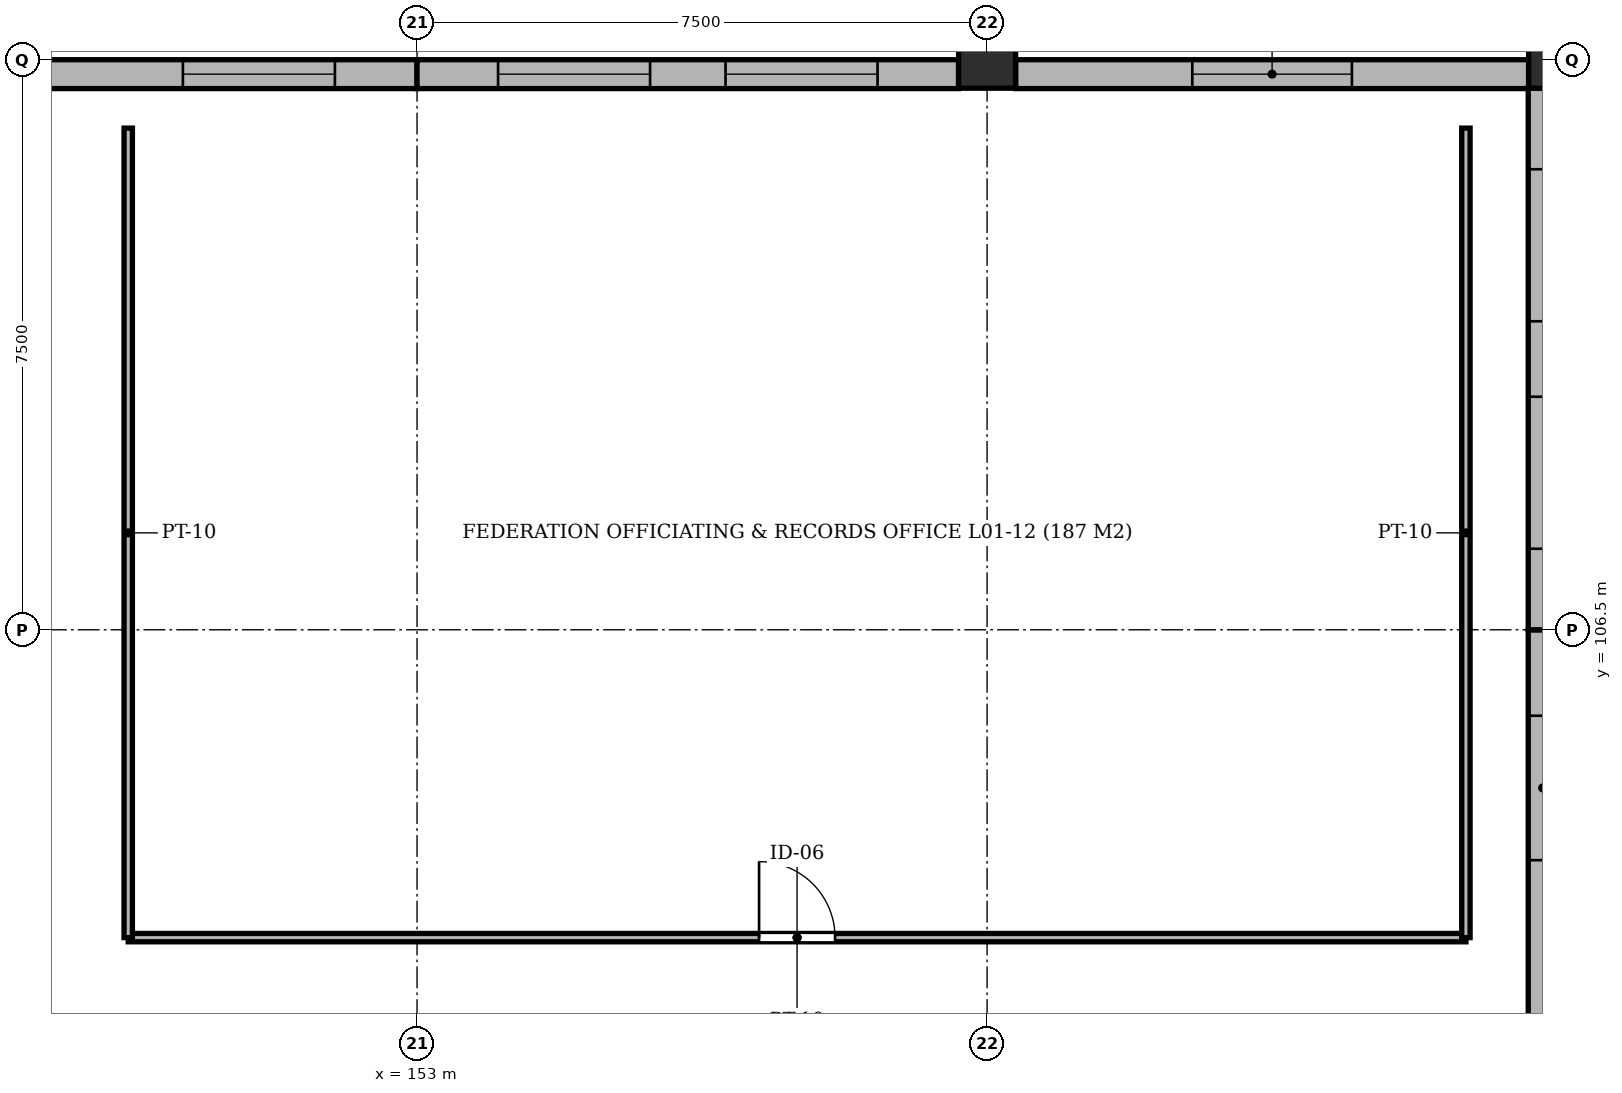
"""IFC4 building model, lengths in metres.
Left out: names, types, materials, properties, quantities, classifications, styles, units other than length and angle.
Written with IfcOpenShell. Run it as: python <this file> out.ifc"""

import sys

from ifc_helpers import new_model, si_unit, direction, frame, frame_2d, origin, origin_2d, place, context, subcontext, project, spatial, rectangle, extrude, element, fill, save


model = new_model("IFC4")
c1 = context("Model", 3, precision=1e-05, world=origin(), true_north=direction((0.0, 1.0)))
c2 = subcontext(c1, "Body", "Model", "MODEL_VIEW")
j1 = project(units=[si_unit("LENGTHUNIT", "METRE"), si_unit("PLANEANGLEUNIT", "RADIAN")], contexts=[c1])
p1 = place(None, origin())
s1 = spatial("IfcSite", under=j1, at=p1, CompositionType="ELEMENT")
p2 = place(p1, origin())
s2 = spatial("IfcBuilding", under=s1, at=p2, CompositionType="ELEMENT")
p3 = place(p2, frame((0.0, 0.0, 4.6)))
s3 = spatial("IfcBuildingStorey", under=s2, at=p3, CompositionType="ELEMENT", Elevation=4.6)
for number, where, z_axis, x_axis in (
    (1, (160.5, 114.0, -0.3), (0.0, 0.0, 1.0), (1.0, 0.0, 0.0)),
    (2, (168.0, 114.0, -0.3), (0.0, 0.0, 1.0), (1.0, 0.0, 0.0)),
):
    element("IfcColumn", number, at=place(p3, frame(where, z_axis=z_axis, x_axis=x_axis)), inside=s3, PredefinedType="COLUMN", context=c2, shape_type="SweptSolid", body=[
        extrude(rectangle(XDim=0.75, YDim=0.75, at=origin_2d()), origin(), (0.0, 0.0, 1.0), 4.65),
    ])
p4 = place(p3, frame((153.0, 113.81, 0.0), z_axis=(0.0, 0.0, 1.0), x_axis=(-1.0, 0.0, 0.0)))
e3 = element("IfcWall", 3, at=p4, inside=s3, PredefinedType="SOLIDWALL", context=c2, shape_type="SweptSolid", body=[
    extrude(rectangle(XDim=7.175, YDim=0.38, at=frame_2d((3.587, 0.0))), origin(), (0.0, 0.0, 1.0), 3.65),
])
p5 = place(p4, frame((1.081, 0.0, 0.92)))
e4 = element("IfcOpeningElement", 4, at=p5, cuts=e3, PredefinedType="OPENING", context=c2, shape_type="SweptSolid", body=[
    extrude(rectangle(XDim=2.0, YDim=2.3, at=frame_2d((1.0, 1.15))), frame((0.0, 0.202, 0.0), z_axis=(0.0, -1.0, 0.0), x_axis=(1.0, 0.0, 0.0)), (0.0, 0.0, 1.0), 0.404),
])
p6 = place(p3, frame((160.125, 113.81, 0.0), z_axis=(0.0, 0.0, 1.0), x_axis=(-1.0, 0.0, 0.0)))
e5 = element("IfcWall", 5, at=p6, inside=s3, PredefinedType="SOLIDWALL", context=c2, shape_type="SweptSolid", body=[
    extrude(rectangle(XDim=7.125, YDim=0.38, at=frame_2d((3.562, 0.0))), origin(), (0.0, 0.0, 1.0), 3.65),
])
p7 = place(p6, frame((4.059, 0.0, 0.92)))
e6 = element("IfcOpeningElement", 6, at=p7, cuts=e5, PredefinedType="OPENING", context=c2, shape_type="SweptSolid", body=[
    extrude(rectangle(XDim=2.0, YDim=2.3, at=frame_2d((1.0, 1.15))), frame((0.0, 0.202, 0.0), z_axis=(0.0, -1.0, 0.0), x_axis=(1.0, 0.0, 0.0)), (0.0, 0.0, 1.0), 0.404),
])
p8 = place(p6, frame((1.066, 0.0, 0.92)))
e7 = element("IfcOpeningElement", 7, at=p8, cuts=e5, PredefinedType="OPENING", context=c2, shape_type="SweptSolid", body=[
    extrude(rectangle(XDim=2.0, YDim=2.3, at=frame_2d((1.0, 1.15))), frame((0.0, 0.202, 0.0), z_axis=(0.0, -1.0, 0.0), x_axis=(1.0, 0.0, 0.0)), (0.0, 0.0, 1.0), 0.404),
])
p9 = place(p3, frame((167.625, 113.81, 0.0), z_axis=(0.0, 0.0, 1.0), x_axis=(-1.0, 0.0, 0.0)))
e8 = element("IfcWall", 8, at=p9, inside=s3, PredefinedType="SOLIDWALL", context=c2, shape_type="SweptSolid", body=[
    extrude(rectangle(XDim=6.75, YDim=0.38, at=frame_2d((3.375, 0.0))), origin(), (0.0, 0.0, 1.0), 4.02),
])
p10 = place(p9, frame((2.325, 0.0, 0.92)))
e9 = element("IfcOpeningElement", 9, at=p10, cuts=e8, PredefinedType="OPENING", context=c2, shape_type="SweptSolid", body=[
    extrude(rectangle(XDim=2.1, YDim=2.3, at=frame_2d((1.05, 1.15))), frame((0.0, 0.202, 0.0), z_axis=(0.0, -1.0, 0.0), x_axis=(1.0, 0.0, 0.0)), (0.0, 0.0, 1.0), 0.404),
])
p11 = place(p3, frame((167.81, 99.325, 0.0), z_axis=(0.0, 0.0, 1.0), x_axis=(0.0, 1.0, 0.0)))
e10 = element("IfcWall", 10, at=p11, inside=s3, PredefinedType="SOLIDWALL", context=c2, shape_type="SweptSolid", body=[
    extrude(rectangle(XDim=7.175, YDim=0.38, at=frame_2d((3.587, 0.0))), origin(), (0.0, 0.0, 1.0), 3.65),
])
p12 = place(p11, frame((4.144, 0.0, 0.92)))
e11 = element("IfcOpeningElement", 11, at=p12, cuts=e10, PredefinedType="OPENING", context=c2, shape_type="SweptSolid", body=[
    extrude(rectangle(XDim=1.9, YDim=2.3, at=frame_2d((0.95, 1.15))), frame((0.0, 0.202, 0.0), z_axis=(0.0, -1.0, 0.0), x_axis=(1.0, 0.0, 0.0)), (0.0, 0.0, 1.0), 0.404),
])
p13 = place(p3, frame((167.81, 106.5, 0.0), z_axis=(0.0, 0.0, 1.0), x_axis=(0.0, 1.0, 0.0)))
e12 = element("IfcWall", 12, at=p13, inside=s3, PredefinedType="SOLIDWALL", context=c2, shape_type="SweptSolid", body=[
    extrude(rectangle(XDim=7.125, YDim=0.38, at=frame_2d((3.562, 0.0))), origin(), (0.0, 0.0, 1.0), 3.65),
])
p14 = place(p13, frame((1.066, 0.0, 0.92)))
e13 = element("IfcOpeningElement", 13, at=p14, cuts=e12, PredefinedType="OPENING", context=c2, shape_type="SweptSolid", body=[
    extrude(rectangle(XDim=2.0, YDim=2.3, at=frame_2d((1.0, 1.15))), frame((0.0, 0.202, 0.0), z_axis=(0.0, -1.0, 0.0), x_axis=(1.0, 0.0, 0.0)), (0.0, 0.0, 1.0), 0.404),
])
p15 = place(p13, frame((4.059, 0.0, 0.92)))
e14 = element("IfcOpeningElement", 14, at=p15, cuts=e12, PredefinedType="OPENING", context=c2, shape_type="SweptSolid", body=[
    extrude(rectangle(XDim=2.0, YDim=2.3, at=frame_2d((1.0, 1.15))), frame((0.0, 0.202, 0.0), z_axis=(0.0, -1.0, 0.0), x_axis=(1.0, 0.0, 0.0)), (0.0, 0.0, 1.0), 0.404),
])
p16 = place(p3, frame((149.2, 102.45, 0.0), z_axis=(0.0, 0.0, 1.0), x_axis=(1.0, 0.0, 0.0)))
e15 = element("IfcWall", 15, at=p16, inside=s3, PredefinedType="PARTITIONING", context=c2, shape_type="SweptSolid", body=[
    extrude(rectangle(XDim=17.6, YDim=0.11, at=frame_2d((8.8, 0.0))), origin(), (0.0, 0.0, 1.0), 4.08),
])
p17 = place(p16, frame((8.3, 0.0, 0.0)))
e16 = element("IfcOpeningElement", 16, at=p17, cuts=e15, PredefinedType="OPENING", context=c2, shape_type="SweptSolid", body=[
    extrude(rectangle(XDim=1.0, YDim=2.15, at=frame_2d((0.5, 1.075))), frame((0.0, 0.067, 0.0), z_axis=(0.0, -1.0, 0.0), x_axis=(1.0, 0.0, 0.0)), (0.0, 0.0, 1.0), 0.134),
])
for number, where, z_axis, x_axis in (
    (17, (149.2, 102.45, 0.0), (0.0, 0.0, 1.0), (0.0, 1.0, 0.0)),
    (18, (166.8, 102.45, 0.0), (0.0, 0.0, 1.0), (0.0, 1.0, 0.0)),
):
    element("IfcWall", number, at=place(p3, frame(where, z_axis=z_axis, x_axis=x_axis)), inside=s3, PredefinedType="PARTITIONING", context=c2, shape_type="SweptSolid", body=[
        extrude(rectangle(XDim=10.65, YDim=0.11, at=frame_2d((5.325, 0.0))), origin(), (0.0, 0.0, 1.0), 4.08),
    ])
p18 = place(p5, origin())
e19 = element("IfcWindow", 19, at=p18, inside=s3, PartitioningType="SINGLE_PANEL", PredefinedType="WINDOW", context=c2, shape_type="SweptSolid", body=[
    extrude(rectangle(XDim=2.0, YDim=2.3, at=frame_2d((1.0, 1.15))), frame((0.0, 0.03, 0.0), z_axis=(0.0, -1.0, 0.0), x_axis=(1.0, 0.0, 0.0)), (0.0, 0.0, 1.0), 0.06),
])
fill(e4, e19)
p19 = place(p7, origin())
e20 = element("IfcWindow", 20, at=p19, inside=s3, PartitioningType="SINGLE_PANEL", PredefinedType="WINDOW", context=c2, shape_type="SweptSolid", body=[
    extrude(rectangle(XDim=2.0, YDim=2.3, at=frame_2d((1.0, 1.15))), frame((0.0, 0.03, 0.0), z_axis=(0.0, -1.0, 0.0), x_axis=(1.0, 0.0, 0.0)), (0.0, 0.0, 1.0), 0.06),
])
fill(e6, e20)
p20 = place(p8, origin())
e21 = element("IfcWindow", 21, at=p20, inside=s3, PartitioningType="SINGLE_PANEL", PredefinedType="WINDOW", context=c2, shape_type="SweptSolid", body=[
    extrude(rectangle(XDim=2.0, YDim=2.3, at=frame_2d((1.0, 1.15))), frame((0.0, 0.03, 0.0), z_axis=(0.0, -1.0, 0.0), x_axis=(1.0, 0.0, 0.0)), (0.0, 0.0, 1.0), 0.06),
])
fill(e7, e21)
p21 = place(p10, origin())
e22 = element("IfcWindow", 22, at=p21, inside=s3, PartitioningType="SINGLE_PANEL", PredefinedType="WINDOW", context=c2, shape_type="SweptSolid", body=[
    extrude(rectangle(XDim=2.1, YDim=2.3, at=frame_2d((1.05, 1.15))), frame((0.0, 0.03, 0.0), z_axis=(0.0, -1.0, 0.0), x_axis=(1.0, 0.0, 0.0)), (0.0, 0.0, 1.0), 0.06),
])
fill(e9, e22)
p22 = place(p12, origin())
e23 = element("IfcWindow", 23, at=p22, inside=s3, PartitioningType="SINGLE_PANEL", PredefinedType="WINDOW", context=c2, shape_type="SweptSolid", body=[
    extrude(rectangle(XDim=1.9, YDim=2.3, at=frame_2d((0.95, 1.15))), frame((0.0, 0.03, 0.0), z_axis=(0.0, -1.0, 0.0), x_axis=(1.0, 0.0, 0.0)), (0.0, 0.0, 1.0), 0.06),
])
fill(e11, e23)
p23 = place(p14, origin())
e24 = element("IfcWindow", 24, at=p23, inside=s3, PartitioningType="SINGLE_PANEL", PredefinedType="WINDOW", context=c2, shape_type="SweptSolid", body=[
    extrude(rectangle(XDim=2.0, YDim=2.3, at=frame_2d((1.0, 1.15))), frame((0.0, 0.03, 0.0), z_axis=(0.0, -1.0, 0.0), x_axis=(1.0, 0.0, 0.0)), (0.0, 0.0, 1.0), 0.06),
])
fill(e13, e24)
p24 = place(p15, origin())
e25 = element("IfcWindow", 25, at=p24, inside=s3, PartitioningType="SINGLE_PANEL", PredefinedType="WINDOW", context=c2, shape_type="SweptSolid", body=[
    extrude(rectangle(XDim=2.0, YDim=2.3, at=frame_2d((1.0, 1.15))), frame((0.0, 0.03, 0.0), z_axis=(0.0, -1.0, 0.0), x_axis=(1.0, 0.0, 0.0)), (0.0, 0.0, 1.0), 0.06),
])
fill(e14, e25)
p25 = place(p17, origin())
e26 = element("IfcDoor", 26, at=p25, inside=s3, OperationType="SINGLE_SWING_LEFT", PredefinedType="DOOR", context=c2, shape_type="SweptSolid", body=[
    extrude(rectangle(XDim=1.0, YDim=2.15, at=frame_2d((0.5, 1.075))), frame((0.0, 0.025, 0.0), z_axis=(0.0, -1.0, 0.0), x_axis=(1.0, 0.0, 0.0)), (0.0, 0.0, 1.0), 0.05),
])
fill(e16, e26)
save(model, sys.argv[1])
